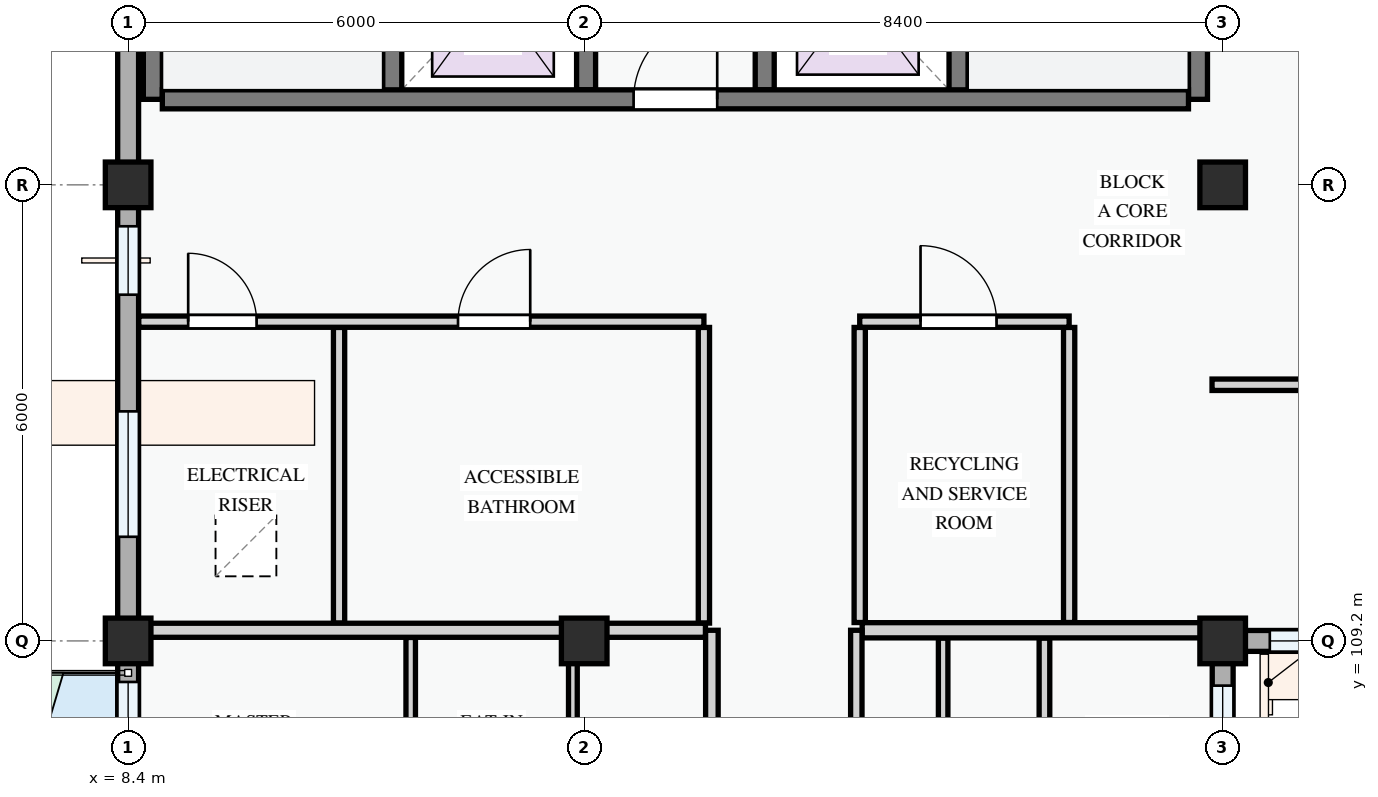
"""IFC4 building model, lengths in metres.
Left out: names, types, materials, properties, quantities, classifications, styles, units other than length and angle.
Written with IfcOpenShell. Run it as: python <this file> out.ifc"""

import sys

from ifc_helpers import new_model, si_unit, direction, frame, frame_2d, origin, origin_2d, place, context, subcontext, project, spatial, rectangle, extrude, element, fill, save


model = new_model("IFC4")
c1 = context("Model", 3, precision=1e-05, world=origin(), true_north=direction((0.0, 1.0)))
c2 = subcontext(c1, "Body", "Model", "MODEL_VIEW")
j1 = project(units=[si_unit("LENGTHUNIT", "METRE"), si_unit("PLANEANGLEUNIT", "RADIAN")], contexts=[c1])
p1 = place(None, origin())
s1 = spatial("IfcSite", under=j1, at=p1, CompositionType="ELEMENT")
p2 = place(p1, origin())
s2 = spatial("IfcBuilding", under=s1, at=p2, CompositionType="ELEMENT")
p3 = place(p2, frame((0.0, 0.0, 31.2)))
s3 = spatial("IfcBuildingStorey", under=s2, at=p3, CompositionType="ELEMENT", Elevation=31.2)
for number, where, z_axis, x_axis in (
    (1, (8.4, 109.2, 0.0), (0.0, 0.0, 1.0), (1.0, 0.0, 0.0)),
    (2, (8.4, 115.2, 0.0), (0.0, 0.0, 1.0), (1.0, 0.0, 0.0)),
    (3, (14.4, 109.2, 0.0), (0.0, 0.0, 1.0), (1.0, 0.0, 0.0)),
    (4, (22.8, 109.2, 0.0), (0.0, 0.0, 1.0), (1.0, 0.0, 0.0)),
    (5, (22.8, 115.2, 0.0), (0.0, 0.0, 1.0), (1.0, 0.0, 0.0)),
):
    element("IfcColumn", number, at=place(p3, frame(where, z_axis=z_axis, x_axis=x_axis)), inside=s3, PredefinedType="COLUMN", context=c2, shape_type="SweptSolid", body=[
        extrude(rectangle(XDim=0.6, YDim=0.6, at=origin_2d()), origin(), (0.0, 0.0, 1.0), 3.3),
    ])
p4 = place(p3, frame((22.8, 109.2, 0.0), z_axis=(0.0, 0.0, 1.0), x_axis=(1.0, 0.0, 0.0)))
e6 = element("IfcWall", 6, at=p4, inside=s3, PredefinedType="STANDARD", context=c2, shape_type="SweptSolid", body=[
    extrude(rectangle(XDim=6.0, YDim=0.275, at=frame_2d((3.0, 0.0))), origin(), (0.0, 0.0, 1.0), 2.525),
])
p5 = place(p4, frame((0.62, 0.0, 0.78)))
e7 = element("IfcOpeningElement", 7, at=p5, cuts=e6, PredefinedType="OPENING", context=c2, shape_type="SweptSolid", body=[
    extrude(rectangle(XDim=1.3, YDim=1.4, at=frame_2d((0.65, 0.7))), frame((0.0, 0.147, 0.0), z_axis=(0.0, -1.0, 0.0), x_axis=(1.0, 0.0, 0.0)), (0.0, 0.0, 1.0), 0.295),
])
p6 = place(p4, frame((3.155, 0.0, 0.78)))
e8 = element("IfcOpeningElement", 8, at=p6, cuts=e6, PredefinedType="OPENING", context=c2, shape_type="SweptSolid", body=[
    extrude(rectangle(XDim=1.85, YDim=1.6, at=frame_2d((0.925, 0.8))), frame((0.0, 0.147, 0.0), z_axis=(0.0, -1.0, 0.0), x_axis=(1.0, 0.0, 0.0)), (0.0, 0.0, 1.0), 0.295),
])
p7 = place(p3, frame((8.4, 123.6, 0.0), z_axis=(0.0, 0.0, 1.0), x_axis=(0.0, -1.0, 0.0)))
e9 = element("IfcWall", 9, at=p7, inside=s3, PredefinedType="STANDARD", context=c2, shape_type="SweptSolid", body=[
    extrude(rectangle(XDim=8.4, YDim=0.275, at=frame_2d((4.2, 0.0))), origin(), (0.0, 0.0, 1.0), 2.425),
])
p8 = place(p7, frame((1.256, 0.0, 0.78)))
e10 = element("IfcOpeningElement", 10, at=p8, cuts=e9, PredefinedType="OPENING", context=c2, shape_type="SweptSolid", body=[
    extrude(rectangle(XDim=1.48, YDim=1.52, at=frame_2d((0.74, 0.76))), frame((0.0, 0.147, 0.0), z_axis=(0.0, -1.0, 0.0), x_axis=(1.0, 0.0, 0.0)), (0.0, 0.0, 1.0), 0.295),
])
p9 = place(p7, frame((4.559, 0.0, 0.78)))
e11 = element("IfcOpeningElement", 11, at=p9, cuts=e9, PredefinedType="OPENING", context=c2, shape_type="SweptSolid", body=[
    extrude(rectangle(XDim=1.82, YDim=1.46, at=frame_2d((0.91, 0.73))), frame((0.0, 0.147, 0.0), z_axis=(0.0, -1.0, 0.0), x_axis=(1.0, 0.0, 0.0)), (0.0, 0.0, 1.0), 0.295),
])
p10 = place(p3, frame((8.4, 115.2, 0.0), z_axis=(0.0, 0.0, 1.0), x_axis=(0.0, -1.0, 0.0)))
e12 = element("IfcWall", 12, at=p10, inside=s3, PredefinedType="STANDARD", context=c2, shape_type="SweptSolid", body=[
    extrude(rectangle(XDim=6.0, YDim=0.275, at=frame_2d((3.0, 0.0))), origin(), (0.0, 0.0, 1.0), 2.575),
])
p11 = place(p10, frame((0.545, 0.0, 0.78)))
e13 = element("IfcOpeningElement", 13, at=p11, cuts=e12, PredefinedType="OPENING", context=c2, shape_type="SweptSolid", body=[
    extrude(rectangle(XDim=0.9, YDim=1.2, at=frame_2d((0.45, 0.6))), frame((0.0, 0.147, 0.0), z_axis=(0.0, -1.0, 0.0), x_axis=(1.0, 0.0, 0.0)), (0.0, 0.0, 1.0), 0.295),
])
p12 = place(p10, frame((2.98, 0.0, 0.78)))
e14 = element("IfcOpeningElement", 14, at=p12, cuts=e12, PredefinedType="OPENING", context=c2, shape_type="SweptSolid", body=[
    extrude(rectangle(XDim=1.65, YDim=1.5, at=frame_2d((0.825, 0.75))), frame((0.0, 0.147, 0.0), z_axis=(0.0, -1.0, 0.0), x_axis=(1.0, 0.0, 0.0)), (0.0, 0.0, 1.0), 0.295),
])
p13 = place(p3, frame((8.4, 109.2, 0.0), z_axis=(0.0, 0.0, 1.0), x_axis=(0.0, -1.0, 0.0)))
e15 = element("IfcWall", 15, at=p13, inside=s3, PredefinedType="STANDARD", context=c2, shape_type="SweptSolid", body=[
    extrude(rectangle(XDim=8.4, YDim=0.275, at=frame_2d((4.2, 0.0))), origin(), (0.0, 0.0, 1.0), 2.425),
])
p14 = place(p13, frame((3.6, 0.0, 0.0)))
e16 = element("IfcOpeningElement", 16, at=p14, cuts=e15, PredefinedType="OPENING", context=c2, shape_type="SweptSolid", body=[
    extrude(rectangle(XDim=1.25, YDim=2.2, at=frame_2d((0.625, 1.1))), frame((0.0, 0.147, 0.0), z_axis=(0.0, -1.0, 0.0), x_axis=(1.0, 0.0, 0.0)), (0.0, 0.0, 1.0), 0.295),
])
p15 = place(p13, frame((0.54, 0.0, 0.78)))
e17 = element("IfcOpeningElement", 17, at=p15, cuts=e15, PredefinedType="OPENING", context=c2, shape_type="SweptSolid", body=[
    extrude(rectangle(XDim=2.38, YDim=1.48, at=frame_2d((1.19, 0.74))), frame((0.0, 0.147, 0.0), z_axis=(0.0, -1.0, 0.0), x_axis=(1.0, 0.0, 0.0)), (0.0, 0.0, 1.0), 0.295),
])
p16 = place(p13, frame((5.34, 0.0, 0.78)))
e18 = element("IfcOpeningElement", 18, at=p16, cuts=e15, PredefinedType="OPENING", context=c2, shape_type="SweptSolid", body=[
    extrude(rectangle(XDim=0.9, YDim=1.2, at=frame_2d((0.45, 0.6))), frame((0.0, 0.147, 0.0), z_axis=(0.0, -1.0, 0.0), x_axis=(1.0, 0.0, 0.0)), (0.0, 0.0, 1.0), 0.295),
])
p17 = place(p13, frame((6.995, 0.0, 0.78)))
e19 = element("IfcOpeningElement", 19, at=p17, cuts=e15, PredefinedType="OPENING", context=c2, shape_type="SweptSolid", body=[
    extrude(rectangle(XDim=0.9, YDim=1.2, at=frame_2d((0.45, 0.6))), frame((0.0, 0.147, 0.0), z_axis=(0.0, -1.0, 0.0), x_axis=(1.0, 0.0, 0.0)), (0.0, 0.0, 1.0), 0.295),
])
p18 = place(p3, frame((22.8, 100.8, 0.0), z_axis=(0.0, 0.0, 1.0), x_axis=(0.0, 1.0, 0.0)))
e20 = element("IfcWall", 20, at=p18, inside=s3, PredefinedType="STANDARD", context=c2, shape_type="SweptSolid", body=[
    extrude(rectangle(XDim=8.4, YDim=0.275, at=frame_2d((4.2, 0.0))), origin(), (0.0, 0.0, 1.0), 2.425),
])
p19 = place(p18, frame((0.505, 0.0, 0.78)))
e21 = element("IfcOpeningElement", 21, at=p19, cuts=e20, PredefinedType="OPENING", context=c2, shape_type="SweptSolid", body=[
    extrude(rectangle(XDim=0.9, YDim=1.2, at=frame_2d((0.45, 0.6))), frame((0.0, 0.147, 0.0), z_axis=(0.0, -1.0, 0.0), x_axis=(1.0, 0.0, 0.0)), (0.0, 0.0, 1.0), 0.295),
])
p20 = place(p18, frame((2.267, 0.0, 0.78)))
e22 = element("IfcOpeningElement", 22, at=p20, cuts=e20, PredefinedType="OPENING", context=c2, shape_type="SweptSolid", body=[
    extrude(rectangle(XDim=2.18, YDim=1.48, at=frame_2d((1.09, 0.74))), frame((0.0, 0.147, 0.0), z_axis=(0.0, -1.0, 0.0), x_axis=(1.0, 0.0, 0.0)), (0.0, 0.0, 1.0), 0.295),
])
p21 = place(p18, frame((5.392, 0.0, 0.78)))
e23 = element("IfcOpeningElement", 23, at=p21, cuts=e20, PredefinedType="OPENING", context=c2, shape_type="SweptSolid", body=[
    extrude(rectangle(XDim=2.42, YDim=1.52, at=frame_2d((1.21, 0.76))), frame((0.0, 0.147, 0.0), z_axis=(0.0, -1.0, 0.0), x_axis=(1.0, 0.0, 0.0)), (0.0, 0.0, 1.0), 0.295),
])
p22 = place(p3, frame((11.875, 123.25, 0.0), z_axis=(0.0, 0.0, 1.0), x_axis=(0.0, -1.0, 0.0)))
e24 = element("IfcWall", 24, at=p22, inside=s3, PredefinedType="SHEAR", context=c2, shape_type="SweptSolid", body=[
    extrude(rectangle(XDim=6.925, YDim=0.25, at=frame_2d((3.462, 0.0))), origin(), (0.0, 0.0, 1.0), 3.0),
])
p23 = place(p22, frame((0.35, 0.0, 0.0)))
e25 = element("IfcOpeningElement", 25, at=p23, cuts=e24, PredefinedType="OPENING", context=c2, shape_type="SweptSolid", body=[
    extrude(rectangle(XDim=0.95, YDim=2.1, at=frame_2d((0.475, 1.05))), frame((0.0, 0.135, 0.0), z_axis=(0.0, -1.0, 0.0), x_axis=(1.0, 0.0, 0.0)), (0.0, 0.0, 1.0), 0.27),
])
p24 = place(p3, frame((8.725, 123.4, 0.0), z_axis=(0.0, 0.0, 1.0), x_axis=(0.0, -1.0, 0.0)))
e26 = element("IfcWall", 26, at=p24, inside=s3, PredefinedType="SHEAR", context=c2, shape_type="SweptSolid", body=[
    extrude(rectangle(XDim=7.075, YDim=0.25, at=frame_2d((3.538, 0.0))), origin(), (0.0, 0.0, 1.0), 3.0),
])
p25 = place(p3, frame((22.475, 123.25, 0.0), z_axis=(0.0, 0.0, 1.0), x_axis=(0.0, -1.0, 0.0)))
e27 = element("IfcWall", 27, at=p25, inside=s3, PredefinedType="SHEAR", context=c2, shape_type="SweptSolid", body=[
    extrude(rectangle(XDim=6.925, YDim=0.25, at=frame_2d((3.462, 0.0))), origin(), (0.0, 0.0, 1.0), 3.0),
])
p26 = place(p3, frame((19.325, 123.25, 0.0), z_axis=(0.0, 0.0, 1.0), x_axis=(0.0, -1.0, 0.0)))
e28 = element("IfcWall", 28, at=p26, inside=s3, PredefinedType="SHEAR", context=c2, shape_type="SweptSolid", body=[
    extrude(rectangle(XDim=6.925, YDim=0.25, at=frame_2d((3.462, 0.0))), origin(), (0.0, 0.0, 1.0), 3.0),
])
p27 = place(p26, frame((0.35, 0.0, 0.0)))
e29 = element("IfcOpeningElement", 29, at=p27, cuts=e28, PredefinedType="OPENING", context=c2, shape_type="SweptSolid", body=[
    extrude(rectangle(XDim=0.95, YDim=2.1, at=frame_2d((0.475, 1.05))), frame((0.0, 0.135, 0.0), z_axis=(0.0, -1.0, 0.0), x_axis=(1.0, 0.0, 0.0)), (0.0, 0.0, 1.0), 0.27),
])
for number, where, z_axis, x_axis in (
    (30, (14.425, 118.875, 0.0), (0.0, 0.0, 1.0), (0.0, -1.0, 0.0)),
    (31, (16.775, 118.875, 0.0), (0.0, 0.0, 1.0), (0.0, -1.0, 0.0)),
):
    element("IfcWall", number, at=place(p3, frame(where, z_axis=z_axis, x_axis=x_axis)), inside=s3, PredefinedType="SHEAR", context=c2, shape_type="SweptSolid", body=[
        extrude(rectangle(XDim=2.425, YDim=0.25, at=frame_2d((1.212, 0.0))), origin(), (0.0, 0.0, 1.0), 3.0),
    ])
p28 = place(p3, frame((8.85, 116.325, 0.0), z_axis=(0.0, 0.0, 1.0), x_axis=(1.0, 0.0, 0.0)))
e32 = element("IfcWall", 32, at=p28, inside=s3, PredefinedType="SHEAR", context=c2, shape_type="SweptSolid", body=[
    extrude(rectangle(XDim=13.5, YDim=0.25, at=frame_2d((6.75, 0.0))), origin(), (0.0, 0.0, 1.0), 3.0),
])
p29 = place(p28, frame((6.2, 0.0, 0.0)))
e33 = element("IfcOpeningElement", 33, at=p29, cuts=e32, PredefinedType="OPENING", context=c2, shape_type="SweptSolid", body=[
    extrude(rectangle(XDim=1.1, YDim=2.15, at=frame_2d((0.55, 1.075))), frame((0.0, 0.135, 0.0), z_axis=(0.0, -1.0, 0.0), x_axis=(1.0, 0.0, 0.0)), (0.0, 0.0, 1.0), 0.27),
])
for number, where, z_axis, x_axis in (
    (34, (11.175, 113.324, 0.0), (0.0, 0.0, 1.0), (0.0, -1.0, 0.0)),
    (35, (15.975, 113.324, 0.0), (0.0, 0.0, 1.0), (0.0, -1.0, 0.0)),
):
    element("IfcWall", number, at=place(p3, frame(where, z_axis=z_axis, x_axis=x_axis)), inside=s3, PredefinedType="PARTITIONING", context=c2, shape_type="SweptSolid", body=[
        extrude(rectangle(XDim=3.889, YDim=0.148, at=frame_2d((1.945, 0.0))), origin(), (0.0, 0.0, 1.0), 3.0),
    ])
for number, where, z_axis, x_axis in (
    (36, (18.025, 113.324, 0.0), (0.0, 0.0, 1.0), (0.0, -1.0, 0.0)),
    (37, (20.78, 113.324, 0.0), (0.0, 0.0, 1.0), (0.0, -1.0, 0.0)),
):
    element("IfcWall", number, at=place(p3, frame(where, z_axis=z_axis, x_axis=x_axis)), inside=s3, PredefinedType="PARTITIONING", context=c2, shape_type="SweptSolid", body=[
        extrude(rectangle(XDim=3.882, YDim=0.148, at=frame_2d((1.941, 0.0))), origin(), (0.0, 0.0, 1.0), 3.0),
    ])
p30 = place(p3, frame((8.54, 113.4, 0.0), z_axis=(0.0, 0.0, 1.0), x_axis=(1.0, 0.0, 0.0)))
e38 = element("IfcWall", 38, at=p30, inside=s3, PredefinedType="PARTITIONING", context=c2, shape_type="SweptSolid", body=[
    extrude(rectangle(XDim=7.435, YDim=0.148, at=frame_2d((3.718, 0.0))), origin(), (0.0, 0.0, 1.0), 3.0),
])
p31 = place(p30, frame((0.65, 0.0, 0.0)))
e39 = element("IfcOpeningElement", 39, at=p31, cuts=e38, PredefinedType="OPENING", context=c2, shape_type="SweptSolid", body=[
    extrude(rectangle(XDim=0.9, YDim=2.1, at=frame_2d((0.45, 1.05))), frame((0.0, 0.084, 0.0), z_axis=(0.0, -1.0, 0.0), x_axis=(1.0, 0.0, 0.0)), (0.0, 0.0, 1.0), 0.168),
])
p32 = place(p30, frame((4.2, 0.0, 0.0)))
e40 = element("IfcOpeningElement", 40, at=p32, cuts=e38, PredefinedType="OPENING", context=c2, shape_type="SweptSolid", body=[
    extrude(rectangle(XDim=0.95, YDim=2.1, at=frame_2d((0.475, 1.05))), frame((0.0, 0.084, 0.0), z_axis=(0.0, -1.0, 0.0), x_axis=(1.0, 0.0, 0.0)), (0.0, 0.0, 1.0), 0.168),
])
p33 = place(p3, frame((18.025, 113.4, 0.0), z_axis=(0.0, 0.0, 1.0), x_axis=(1.0, 0.0, 0.0)))
e41 = element("IfcWall", 41, at=p33, inside=s3, PredefinedType="PARTITIONING", context=c2, shape_type="SweptSolid", body=[
    extrude(rectangle(XDim=2.755, YDim=0.148, at=frame_2d((1.377, 0.0))), origin(), (0.0, 0.0, 1.0), 3.0),
])
p34 = place(p33, frame((0.8, 0.0, 0.0)))
e42 = element("IfcOpeningElement", 42, at=p34, cuts=e41, PredefinedType="OPENING", context=c2, shape_type="SweptSolid", body=[
    extrude(rectangle(XDim=1.0, YDim=2.15, at=frame_2d((0.5, 1.075))), frame((0.0, 0.084, 0.0), z_axis=(0.0, -1.0, 0.0), x_axis=(1.0, 0.0, 0.0)), (0.0, 0.0, 1.0), 0.168),
])
p35 = place(p3, frame((22.66, 112.57, 0.0), z_axis=(0.0, 0.0, 1.0), x_axis=(1.0, 0.0, 0.0)))
e43 = element("IfcWall", 43, at=p35, inside=s3, PredefinedType="PARTITIONING", context=c2, shape_type="SweptSolid", body=[
    extrude(rectangle(XDim=2.406, YDim=0.15, at=frame_2d((1.203, 0.0))), origin(), (0.0, 0.0, 1.0), 3.0),
])
p36 = place(p3, frame((12.118, 106.002, 0.0), z_axis=(0.0, 0.0, 1.0), x_axis=(0.0, 1.0, 0.0)))
e44 = element("IfcWall", 44, at=p36, inside=s3, PredefinedType="PARTITIONING", context=c2, shape_type="SweptSolid", body=[
    extrude(rectangle(XDim=3.244, YDim=0.125, at=frame_2d((1.622, 0.0))), origin(), (0.0, 0.0, 1.0), 3.0),
])
p37 = place(p3, frame((14.251, 106.002, 0.0), z_axis=(0.0, 0.0, 1.0), x_axis=(0.0, 1.0, 0.0)))
e45 = element("IfcWall", 45, at=p37, inside=s3, PredefinedType="PARTITIONING", context=c2, shape_type="SweptSolid", body=[
    extrude(rectangle(XDim=3.244, YDim=0.115, at=frame_2d((1.622, 0.0))), origin(), (0.0, 0.0, 1.0), 2.425),
])
p38 = place(p3, frame((20.455, 105.846, 0.0), z_axis=(0.0, 0.0, 1.0), x_axis=(0.0, 1.0, 0.0)))
e46 = element("IfcWall", 46, at=p38, inside=s3, PredefinedType="PARTITIONING", context=c2, shape_type="SweptSolid", body=[
    extrude(rectangle(XDim=3.392, YDim=0.14, at=frame_2d((1.696, 0.0))), origin(), (0.0, 0.0, 1.0), 3.0),
])
p39 = place(p3, frame((19.122, 105.846, 0.0), z_axis=(0.0, 0.0, 1.0), x_axis=(0.0, 1.0, 0.0)))
e47 = element("IfcWall", 47, at=p39, inside=s3, PredefinedType="PARTITIONING", context=c2, shape_type="SweptSolid", body=[
    extrude(rectangle(XDim=3.392, YDim=0.125, at=frame_2d((1.696, 0.0))), origin(), (0.0, 0.0, 1.0), 3.0),
])
p40 = place(p3, frame((8.54, 109.34, 0.0), z_axis=(0.0, 0.0, 1.0), x_axis=(1.0, 0.0, 0.0)))
e48 = element("IfcWall", 48, at=p40, inside=s3, PredefinedType="PARTITIONING", context=c2, shape_type="SweptSolid", body=[
    extrude(rectangle(XDim=7.456, YDim=0.185, at=frame_2d((3.728, 0.0))), origin(), (0.0, 0.0, 1.0), 2.375),
])
p41 = place(p3, frame((18.057, 109.34, 0.0), z_axis=(0.0, 0.0, 1.0), x_axis=(1.0, 0.0, 0.0)))
e49 = element("IfcWall", 49, at=p41, inside=s3, PredefinedType="PARTITIONING", context=c2, shape_type="SweptSolid", body=[
    extrude(rectangle(XDim=4.683, YDim=0.2, at=frame_2d((2.342, 0.0))), origin(), (0.0, 0.0, 1.0), 2.375),
])
p42 = place(p3, frame((16.08, 86.46, 0.0), z_axis=(0.0, 0.0, 1.0), x_axis=(0.0, 1.0, 0.0)))
e50 = element("IfcWall", 50, at=p42, inside=s3, PredefinedType="PARTITIONING", context=c2, shape_type="SweptSolid", body=[
    extrude(rectangle(XDim=22.88, YDim=0.165, at=frame_2d((11.44, 0.0))), origin(), (0.0, 0.0, 1.0), 3.0),
])
p43 = place(p42, frame((2.08, 0.0, 0.0)))
e51 = element("IfcOpeningElement", 51, at=p43, cuts=e50, PredefinedType="OPENING", context=c2, shape_type="SweptSolid", body=[
    extrude(rectangle(XDim=0.92, YDim=2.1, at=frame_2d((0.46, 1.05))), frame((0.0, 0.093, 0.0), z_axis=(0.0, -1.0, 0.0), x_axis=(1.0, 0.0, 0.0)), (0.0, 0.0, 1.0), 0.185),
])
p44 = place(p42, frame((10.11, 0.0, 0.0)))
e52 = element("IfcOpeningElement", 52, at=p44, cuts=e50, PredefinedType="OPENING", context=c2, shape_type="SweptSolid", body=[
    extrude(rectangle(XDim=0.92, YDim=2.1, at=frame_2d((0.46, 1.05))), frame((0.0, 0.093, 0.0), z_axis=(0.0, -1.0, 0.0), x_axis=(1.0, 0.0, 0.0)), (0.0, 0.0, 1.0), 0.185),
])
p45 = place(p42, frame((18.077, 0.0, 0.0)))
e53 = element("IfcOpeningElement", 53, at=p45, cuts=e50, PredefinedType="OPENING", context=c2, shape_type="SweptSolid", body=[
    extrude(rectangle(XDim=0.92, YDim=2.1, at=frame_2d((0.46, 1.05))), frame((0.0, 0.093, 0.0), z_axis=(0.0, -1.0, 0.0), x_axis=(1.0, 0.0, 0.0)), (0.0, 0.0, 1.0), 0.185),
])
p46 = place(p3, frame((17.98, 86.46, 0.0), z_axis=(0.0, 0.0, 1.0), x_axis=(0.0, 1.0, 0.0)))
e54 = element("IfcWall", 54, at=p46, inside=s3, PredefinedType="PARTITIONING", context=c2, shape_type="SweptSolid", body=[
    extrude(rectangle(XDim=22.88, YDim=0.15, at=frame_2d((11.44, 0.0))), origin(), (0.0, 0.0, 1.0), 3.0),
])
p47 = place(p46, frame((1.948, 0.0, 0.0)))
e55 = element("IfcOpeningElement", 55, at=p47, cuts=e54, PredefinedType="OPENING", context=c2, shape_type="SweptSolid", body=[
    extrude(rectangle(XDim=0.96, YDim=2.12, at=frame_2d((0.48, 1.06))), frame((0.0, 0.085, 0.0), z_axis=(0.0, -1.0, 0.0), x_axis=(1.0, 0.0, 0.0)), (0.0, 0.0, 1.0), 0.17),
])
p48 = place(p46, frame((9.92, 0.0, 0.0)))
e56 = element("IfcOpeningElement", 56, at=p48, cuts=e54, PredefinedType="OPENING", context=c2, shape_type="SweptSolid", body=[
    extrude(rectangle(XDim=0.92, YDim=2.1, at=frame_2d((0.46, 1.05))), frame((0.0, 0.085, 0.0), z_axis=(0.0, -1.0, 0.0), x_axis=(1.0, 0.0, 0.0)), (0.0, 0.0, 1.0), 0.17),
])
p49 = place(p46, frame((18.067, 0.0, 0.0)))
e57 = element("IfcOpeningElement", 57, at=p49, cuts=e54, PredefinedType="OPENING", context=c2, shape_type="SweptSolid", body=[
    extrude(rectangle(XDim=0.92, YDim=2.1, at=frame_2d((0.46, 1.05))), frame((0.0, 0.085, 0.0), z_axis=(0.0, -1.0, 0.0), x_axis=(1.0, 0.0, 0.0)), (0.0, 0.0, 1.0), 0.17),
])
p50 = place(p5, origin())
e58 = element("IfcWindow", 58, at=p50, inside=s3, PartitioningType="SINGLE_PANEL", PredefinedType="WINDOW", context=c2, shape_type="SweptSolid", body=[
    extrude(rectangle(XDim=1.3, YDim=1.4, at=frame_2d((0.65, 0.7))), frame((0.0, 0.03, 0.0), z_axis=(0.0, -1.0, 0.0), x_axis=(1.0, 0.0, 0.0)), (0.0, 0.0, 1.0), 0.06),
])
fill(e7, e58)
p51 = place(p11, origin())
e59 = element("IfcWindow", 59, at=p51, inside=s3, PartitioningType="SINGLE_PANEL", PredefinedType="WINDOW", context=c2, shape_type="SweptSolid", body=[
    extrude(rectangle(XDim=0.9, YDim=1.2, at=frame_2d((0.45, 0.6))), frame((0.0, 0.03, 0.0), z_axis=(0.0, -1.0, 0.0), x_axis=(1.0, 0.0, 0.0)), (0.0, 0.0, 1.0), 0.06),
])
fill(e13, e59)
p52 = place(p12, origin())
e60 = element("IfcWindow", 60, at=p52, inside=s3, PartitioningType="DOUBLE_PANEL_VERTICAL", PredefinedType="WINDOW", context=c2, shape_type="SweptSolid", body=[
    extrude(rectangle(XDim=1.65, YDim=1.5, at=frame_2d((0.825, 0.75))), frame((0.0, 0.03, 0.0), z_axis=(0.0, -1.0, 0.0), x_axis=(1.0, 0.0, 0.0)), (0.0, 0.0, 1.0), 0.06),
])
fill(e14, e60)
p53 = place(p15, origin())
e61 = element("IfcWindow", 61, at=p53, inside=s3, PartitioningType="DOUBLE_PANEL_VERTICAL", PredefinedType="WINDOW", context=c2, shape_type="SweptSolid", body=[
    extrude(rectangle(XDim=2.38, YDim=1.48, at=frame_2d((1.19, 0.74))), frame((0.0, 0.03, 0.0), z_axis=(0.0, -1.0, 0.0), x_axis=(1.0, 0.0, 0.0)), (0.0, 0.0, 1.0), 0.06),
])
fill(e17, e61)
p54 = place(p21, origin())
e62 = element("IfcWindow", 62, at=p54, inside=s3, PartitioningType="DOUBLE_PANEL_VERTICAL", PredefinedType="WINDOW", context=c2, shape_type="SweptSolid", body=[
    extrude(rectangle(XDim=2.42, YDim=1.52, at=frame_2d((1.21, 0.76))), frame((0.0, 0.03, 0.0), z_axis=(0.0, -1.0, 0.0), x_axis=(1.0, 0.0, 0.0)), (0.0, 0.0, 1.0), 0.06),
])
fill(e23, e62)
p55 = place(p29, origin())
e63 = element("IfcDoor", 63, at=p55, inside=s3, OperationType="SINGLE_SWING_RIGHT", PredefinedType="DOOR", context=c2, shape_type="SweptSolid", body=[
    extrude(rectangle(XDim=1.1, YDim=2.15, at=frame_2d((0.55, 1.075))), frame((0.0, 0.025, 0.0), z_axis=(0.0, -1.0, 0.0), x_axis=(1.0, 0.0, 0.0)), (0.0, 0.0, 1.0), 0.05),
])
fill(e33, e63)
p56 = place(p31, origin())
e64 = element("IfcDoor", 64, at=p56, inside=s3, OperationType="SINGLE_SWING_LEFT", PredefinedType="DOOR", context=c2, shape_type="SweptSolid", body=[
    extrude(rectangle(XDim=0.9, YDim=2.1, at=frame_2d((0.45, 1.05))), frame((0.0, 0.025, 0.0), z_axis=(0.0, -1.0, 0.0), x_axis=(1.0, 0.0, 0.0)), (0.0, 0.0, 1.0), 0.05),
])
fill(e39, e64)
p57 = place(p32, origin())
e65 = element("IfcDoor", 65, at=p57, inside=s3, OperationType="SINGLE_SWING_RIGHT", PredefinedType="DOOR", context=c2, shape_type="SweptSolid", body=[
    extrude(rectangle(XDim=0.95, YDim=2.1, at=frame_2d((0.475, 1.05))), frame((0.0, 0.025, 0.0), z_axis=(0.0, -1.0, 0.0), x_axis=(1.0, 0.0, 0.0)), (0.0, 0.0, 1.0), 0.05),
])
fill(e40, e65)
p58 = place(p34, origin())
e66 = element("IfcDoor", 66, at=p58, inside=s3, OperationType="SINGLE_SWING_LEFT", PredefinedType="DOOR", context=c2, shape_type="SweptSolid", body=[
    extrude(rectangle(XDim=1.0, YDim=2.15, at=frame_2d((0.5, 1.075))), frame((0.0, 0.025, 0.0), z_axis=(0.0, -1.0, 0.0), x_axis=(1.0, 0.0, 0.0)), (0.0, 0.0, 1.0), 0.05),
])
fill(e42, e66)
save(model, sys.argv[1])
